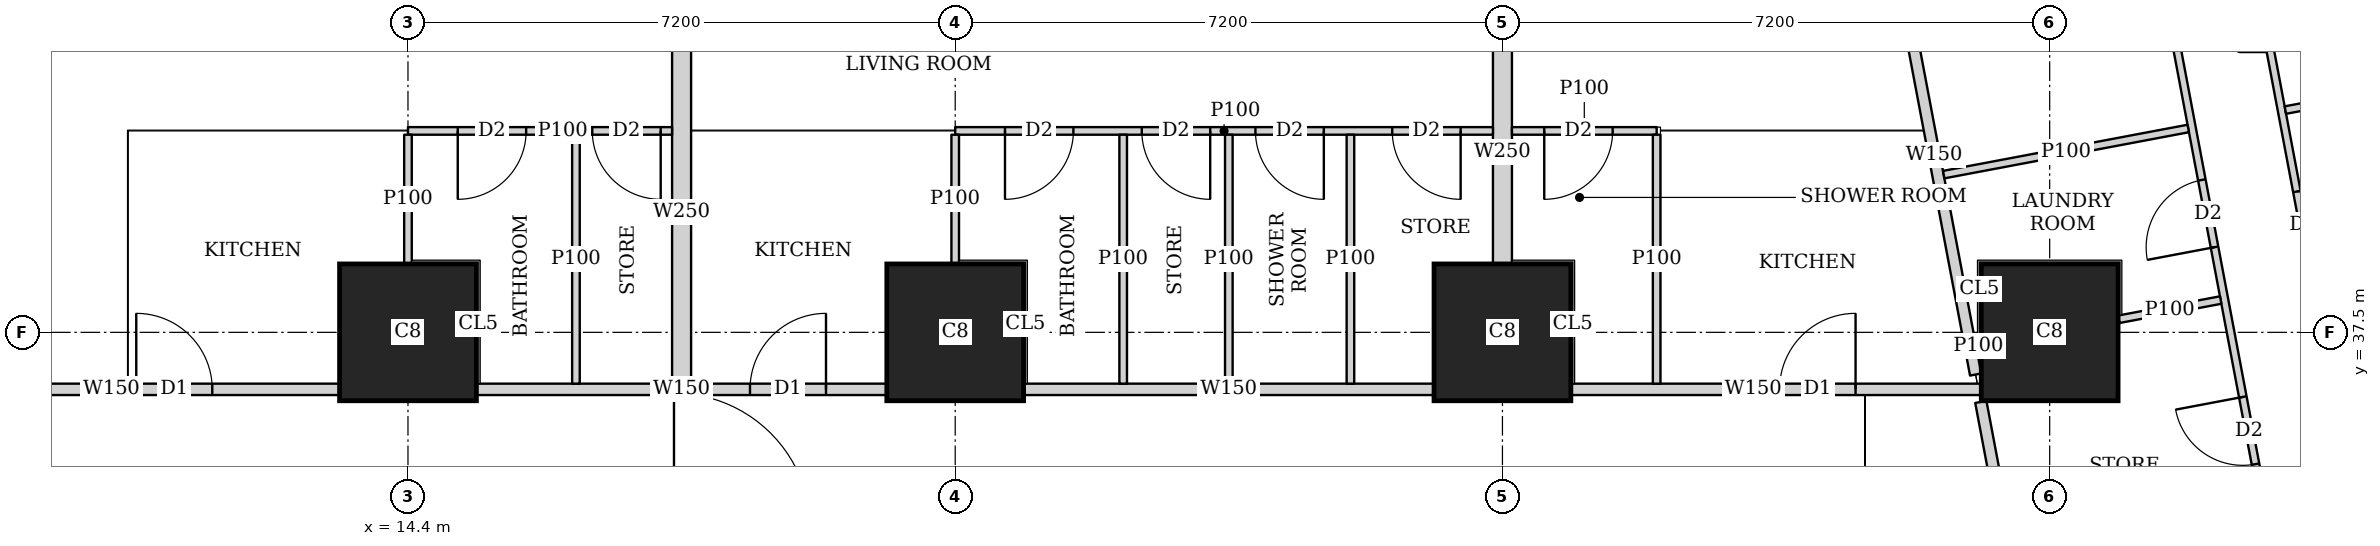
"""IFC4 building model, lengths in metres.
Left out: names, types, materials, properties, quantities, classifications, styles, units other than length and angle.
Written with IfcOpenShell. Run it as: python <this file> out.ifc"""

import sys

from ifc_helpers import new_model, si_unit, direction, frame, frame_2d, origin, origin_2d, place, context, subcontext, project, spatial, rectangle, extrude, element, fill, save


model = new_model("IFC4")
c1 = context("Model", 3, precision=1e-05, world=origin(), true_north=direction((0.0, 1.0)))
c2 = subcontext(c1, "Body", "Model", "MODEL_VIEW")
j1 = project(units=[si_unit("LENGTHUNIT", "METRE"), si_unit("PLANEANGLEUNIT", "RADIAN")], contexts=[c1])
p1 = place(None, origin())
s1 = spatial("IfcSite", under=j1, at=p1, CompositionType="ELEMENT")
p2 = place(p1, origin())
s2 = spatial("IfcBuilding", under=s1, at=p2, CompositionType="ELEMENT")
p3 = place(p2, frame((0.0, 0.0, 53.75)))
s3 = spatial("IfcBuildingStorey", under=s2, at=p3, CompositionType="ELEMENT", Elevation=53.75)
for number, where, z_axis, x_axis in (
    (1, (14.4, 37.5, 0.0), (0.0, 0.0, 1.0), (1.0, 0.0, 0.0)),
    (2, (21.6, 37.5, 0.0), (0.0, 0.0, 1.0), (1.0, 0.0, 0.0)),
    (3, (28.8, 37.5, 0.0), (0.0, 0.0, 1.0), (1.0, 0.0, 0.0)),
    (4, (36.0, 37.5, 0.0), (0.0, 0.0, 1.0), (1.0, 0.0, 0.0)),
):
    element("IfcColumn", number, at=place(p3, frame(where, z_axis=z_axis, x_axis=x_axis)), inside=s3, PredefinedType="COLUMN", context=c2, shape_type="SweptSolid", body=[
        extrude(rectangle(XDim=1.8, YDim=1.8, at=origin_2d()), origin(), (0.0, 0.0, 1.0), 3.75),
    ])
p4 = place(p3, frame((8.1, 36.75, 0.0), z_axis=(0.0, 0.0, 1.0), x_axis=(1.0, 0.0, 0.0)))
e5 = element("IfcWall", 5, at=p4, inside=s3, PredefinedType="SOLIDWALL", context=c2, shape_type="SweptSolid", body=[
    extrude(rectangle(XDim=5.399, YDim=0.15, at=frame_2d((2.699, 0.0))), origin(), (0.0, 0.0, 1.0), 3.5),
])
p5 = place(p4, frame((2.725, 0.0, 0.0)))
e6 = element("IfcOpeningElement", 6, at=p5, cuts=e5, PredefinedType="OPENING", context=c2, shape_type="SweptSolid", body=[
    extrude(rectangle(XDim=1.0, YDim=2.1, at=frame_2d((0.5, 1.05))), frame((0.0, 0.085, 0.0), z_axis=(0.0, -1.0, 0.0), x_axis=(1.0, 0.0, 0.0)), (0.0, 0.0, 1.0), 0.17),
])
p6 = place(p3, frame((15.301, 36.75, 0.0), z_axis=(0.0, 0.0, 1.0), x_axis=(1.0, 0.0, 0.0)))
e7 = element("IfcWall", 7, at=p6, inside=s3, PredefinedType="SOLIDWALL", context=c2, shape_type="SweptSolid", body=[
    extrude(rectangle(XDim=5.398, YDim=0.15, at=frame_2d((2.699, 0.0))), origin(), (0.0, 0.0, 1.0), 3.5),
])
p7 = place(p6, frame((3.599, 0.0, 0.0)))
e8 = element("IfcOpeningElement", 8, at=p7, cuts=e7, PredefinedType="OPENING", context=c2, shape_type="SweptSolid", body=[
    extrude(rectangle(XDim=1.0, YDim=2.1, at=frame_2d((0.5, 1.05))), frame((0.0, 0.085, 0.0), z_axis=(0.0, -1.0, 0.0), x_axis=(1.0, 0.0, 0.0)), (0.0, 0.0, 1.0), 0.17),
])
p8 = place(p3, frame((22.501, 36.75, 0.0), z_axis=(0.0, 0.0, 1.0), x_axis=(1.0, 0.0, 0.0)))
e9 = element("IfcWall", 9, at=p8, inside=s3, PredefinedType="SOLIDWALL", context=c2, shape_type="SweptSolid", body=[
    extrude(rectangle(XDim=5.398, YDim=0.15, at=frame_2d((2.699, 0.0))), origin(), (0.0, 0.0, 1.0), 3.5),
])
p9 = place(p3, frame((29.701, 36.75, 0.0), z_axis=(0.0, 0.0, 1.0), x_axis=(1.0, 0.0, 0.0)))
e10 = element("IfcWall", 10, at=p9, inside=s3, PredefinedType="SOLIDWALL", context=c2, shape_type="SweptSolid", body=[
    extrude(rectangle(XDim=5.399, YDim=0.15, at=frame_2d((2.7, 0.0))), origin(), (0.0, 0.0, 1.0), 3.5),
])
p10 = place(p9, frame((2.745, 0.0, 0.0)))
e11 = element("IfcOpeningElement", 11, at=p10, cuts=e10, PredefinedType="OPENING", context=c2, shape_type="SweptSolid", body=[
    extrude(rectangle(XDim=1.0, YDim=2.1, at=frame_2d((0.5, 1.05))), frame((0.0, 0.085, 0.0), z_axis=(0.0, -1.0, 0.0), x_axis=(1.0, 0.0, 0.0)), (0.0, 0.0, 1.0), 0.17),
])
p11 = place(p3, frame((33.933, 42.73, 0.0), z_axis=(0.0, 0.0, 1.0), x_axis=(0.185617897238, -0.982622000682, 0.0)))
e12 = element("IfcWall", 12, at=p11, inside=s3, PredefinedType="SOLIDWALL", context=c2, shape_type="SweptSolid", body=[
    extrude(rectangle(XDim=5.887, YDim=0.15, at=frame_2d((2.944, 0.0))), origin(), (0.0, 0.0, 1.0), 3.5),
])
p12 = place(p3, frame((35.094, 36.585, 0.0), z_axis=(0.0, 0.0, 1.0), x_axis=(0.185588860311, -0.982627485331, 0.0)))
e13 = element("IfcWall", 13, at=p12, inside=s3, PredefinedType="SOLIDWALL", context=c2, shape_type="SweptSolid", body=[
    extrude(rectangle(XDim=34.797, YDim=0.15, at=frame_2d((17.399, 0.0))), origin(), (0.0, 0.0, 1.0), 2.5),
])
p13 = place(p12, frame((9.828, 0.0, 0.0)))
e14 = element("IfcOpeningElement", 14, at=p13, cuts=e13, PredefinedType="OPENING", context=c2, shape_type="SweptSolid", body=[
    extrude(rectangle(XDim=1.0, YDim=2.1, at=frame_2d((0.5, 1.05))), frame((0.0, 0.085, 0.0), z_axis=(0.0, -1.0, 0.0), x_axis=(1.0, 0.0, 0.0)), (0.0, 0.0, 1.0), 0.17),
])
p14 = place(p12, frame((13.645, 0.0, 0.0)))
e15 = element("IfcOpeningElement", 15, at=p14, cuts=e13, PredefinedType="OPENING", context=c2, shape_type="SweptSolid", body=[
    extrude(rectangle(XDim=1.0, YDim=2.1, at=frame_2d((0.5, 1.05))), frame((0.0, 0.085, 0.0), z_axis=(0.0, -1.0, 0.0), x_axis=(1.0, 0.0, 0.0)), (0.0, 0.0, 1.0), 0.17),
])
p15 = place(p12, frame((25.9, 0.0, 0.0)))
e16 = element("IfcOpeningElement", 16, at=p15, cuts=e13, PredefinedType="OPENING", context=c2, shape_type="SweptSolid", body=[
    extrude(rectangle(XDim=1.0, YDim=2.1, at=frame_2d((0.5, 1.05))), frame((0.0, 0.085, 0.0), z_axis=(0.0, -1.0, 0.0), x_axis=(1.0, 0.0, 0.0)), (0.0, 0.0, 1.0), 0.17),
])
p16 = place(p3, frame((38.9, 41.22, 0.0), z_axis=(0.0, 0.0, 1.0), x_axis=(0.185521843026, -0.98264014052, 0.0)))
e17 = element("IfcWall", 17, at=p16, inside=s3, PredefinedType="PARTITIONING", context=c2, shape_type="SweptSolid", body=[
    extrude(rectangle(XDim=12.058, YDim=0.1, at=frame_2d((6.029, 0.0))), origin(), (0.0, 0.0, 1.0), 2.5),
])
p17 = place(p16, frame((9.55, 0.0, 0.0)))
e18 = element("IfcOpeningElement", 18, at=p17, cuts=e17, PredefinedType="OPENING", context=c2, shape_type="SweptSolid", body=[
    extrude(rectangle(XDim=0.9, YDim=2.1, at=frame_2d((0.45, 1.05))), frame((0.0, 0.06, 0.0), z_axis=(0.0, -1.0, 0.0), x_axis=(1.0, 0.0, 0.0)), (0.0, 0.0, 1.0), 0.12),
])
p18 = place(p16, frame((7.352, 0.0, 0.0)))
e19 = element("IfcOpeningElement", 19, at=p18, cuts=e17, PredefinedType="OPENING", context=c2, shape_type="SweptSolid", body=[
    extrude(rectangle(XDim=0.9, YDim=2.1, at=frame_2d((0.45, 1.05))), frame((0.0, 0.06, 0.0), z_axis=(0.0, -1.0, 0.0), x_axis=(1.0, 0.0, 0.0)), (0.0, 0.0, 1.0), 0.12),
])
p19 = place(p16, frame((1.9, 0.0, 0.0)))
e20 = element("IfcOpeningElement", 20, at=p19, cuts=e17, PredefinedType="OPENING", context=c2, shape_type="SweptSolid", body=[
    extrude(rectangle(XDim=0.9, YDim=2.1, at=frame_2d((0.45, 1.05))), frame((0.0, 0.06, 0.0), z_axis=(0.0, -1.0, 0.0), x_axis=(1.0, 0.0, 0.0)), (0.0, 0.0, 1.0), 0.12),
])
p20 = place(p3, frame((37.514, 42.089, 0.0), z_axis=(0.0, 0.0, 1.0), x_axis=(0.1856087397, -0.982623730503, 0.0)))
e21 = element("IfcWall", 21, at=p20, inside=s3, PredefinedType="PARTITIONING", context=c2, shape_type="SweptSolid", body=[
    extrude(rectangle(XDim=13.33, YDim=0.1, at=frame_2d((6.665, 0.0))), origin(), (0.0, 0.0, 1.0), 2.5),
])
p21 = place(p20, frame((11.825, 0.0, 0.0)))
e22 = element("IfcOpeningElement", 22, at=p21, cuts=e21, PredefinedType="OPENING", context=c2, shape_type="SweptSolid", body=[
    extrude(rectangle(XDim=0.9, YDim=2.1, at=frame_2d((0.45, 1.05))), frame((0.0, 0.06, 0.0), z_axis=(0.0, -1.0, 0.0), x_axis=(1.0, 0.0, 0.0)), (0.0, 0.0, 1.0), 0.12),
])
p22 = place(p20, frame((8.203, 0.0, 0.0)))
e23 = element("IfcOpeningElement", 23, at=p22, cuts=e21, PredefinedType="OPENING", context=c2, shape_type="SweptSolid", body=[
    extrude(rectangle(XDim=0.9, YDim=2.1, at=frame_2d((0.45, 1.05))), frame((0.0, 0.06, 0.0), z_axis=(0.0, -1.0, 0.0), x_axis=(1.0, 0.0, 0.0)), (0.0, 0.0, 1.0), 0.12),
])
p23 = place(p20, frame((2.63, 0.0, 0.0)))
e24 = element("IfcOpeningElement", 24, at=p23, cuts=e21, PredefinedType="OPENING", context=c2, shape_type="SweptSolid", body=[
    extrude(rectangle(XDim=0.9, YDim=2.1, at=frame_2d((0.45, 1.05))), frame((0.0, 0.06, 0.0), z_axis=(0.0, -1.0, 0.0), x_axis=(1.0, 0.0, 0.0)), (0.0, 0.0, 1.0), 0.12),
])
p24 = place(p20, frame((9.916, 0.0, 0.0)))
e25 = element("IfcOpeningElement", 25, at=p24, cuts=e21, PredefinedType="OPENING", context=c2, shape_type="SweptSolid", body=[
    extrude(rectangle(XDim=0.9, YDim=2.1, at=frame_2d((0.45, 1.05))), frame((0.0, 0.06, 0.0), z_axis=(0.0, -1.0, 0.0), x_axis=(1.0, 0.0, 0.0)), (0.0, 0.0, 1.0), 0.12),
])
p25 = place(p20, frame((5.535, 0.0, 0.0)))
e26 = element("IfcOpeningElement", 26, at=p25, cuts=e21, PredefinedType="OPENING", context=c2, shape_type="SweptSolid", body=[
    extrude(rectangle(XDim=0.9, YDim=2.1, at=frame_2d((0.45, 1.05))), frame((0.0, 0.06, 0.0), z_axis=(0.0, -1.0, 0.0), x_axis=(1.0, 0.0, 0.0)), (0.0, 0.0, 1.0), 0.12),
])
p26 = place(p3, frame((43.277, 41.212, 0.0), z_axis=(0.0, 0.0, 1.0), x_axis=(-0.982665405803, -0.185387972203, 0.0)))
e27 = element("IfcWall", 27, at=p26, inside=s3, PredefinedType="PARTITIONING", context=c2, shape_type="SweptSolid", body=[
    extrude(rectangle(XDim=4.25, YDim=0.1, at=frame_2d((2.125, 0.0))), origin(), (0.0, 0.0, 1.0), 2.05),
])
p27 = place(p3, frame((37.823, 40.182, 0.0), z_axis=(0.0, 0.0, 1.0), x_axis=(-0.982664729897, -0.18539155487, 0.0)))
e28 = element("IfcWall", 28, at=p27, inside=s3, PredefinedType="PARTITIONING", context=c2, shape_type="SweptSolid", body=[
    extrude(rectangle(XDim=3.274, YDim=0.1, at=frame_2d((1.637, 0.0))), origin(), (0.0, 0.0, 1.0), 3.5),
])
p28 = place(p3, frame((38.25, 37.925, 0.0), z_axis=(0.0, 0.0, 1.0), x_axis=(-0.982650574676, -0.185466568658, 0.0)))
e29 = element("IfcWall", 29, at=p28, inside=s3, PredefinedType="PARTITIONING", context=c2, shape_type="SweptSolid", body=[
    extrude(rectangle(XDim=1.364, YDim=0.1, at=frame_2d((0.682, 0.0))), origin(), (0.0, 0.0, 1.0), 3.5),
])
p29 = place(p3, frame((35.09, 37.328, 0.0), z_axis=(0.0, 0.0, 1.0), x_axis=(-0.982590620415, -0.185783940835, 0.0)))
e30 = element("IfcWall", 30, at=p29, inside=s3, PredefinedType="PARTITIONING", context=c2, shape_type="SweptSolid", body=[
    extrude(rectangle(XDim=0.059, YDim=0.1, at=frame_2d((0.03, 0.0))), origin(), (0.0, 0.0, 1.0), 3.5),
])
p30 = place(p3, frame((14.4, 40.15, 0.0), z_axis=(0.0, 0.0, 1.0), x_axis=(1.0, 0.0, 0.0)))
e31 = element("IfcWall", 31, at=p30, inside=s3, PredefinedType="PARTITIONING", context=c2, shape_type="SweptSolid", body=[
    extrude(rectangle(XDim=3.475, YDim=0.1, at=frame_2d((1.738, 0.0))), origin(), (0.0, 0.0, 1.0), 3.5),
])
p31 = place(p30, frame((0.655, 0.0, 0.0)))
e32 = element("IfcOpeningElement", 32, at=p31, cuts=e31, PredefinedType="OPENING", context=c2, shape_type="SweptSolid", body=[
    extrude(rectangle(XDim=0.9, YDim=2.1, at=frame_2d((0.45, 1.05))), frame((0.0, 0.06, 0.0), z_axis=(0.0, -1.0, 0.0), x_axis=(1.0, 0.0, 0.0)), (0.0, 0.0, 1.0), 0.12),
])
p32 = place(p30, frame((2.425, 0.0, 0.0)))
e33 = element("IfcOpeningElement", 33, at=p32, cuts=e31, PredefinedType="OPENING", context=c2, shape_type="SweptSolid", body=[
    extrude(rectangle(XDim=0.9, YDim=2.1, at=frame_2d((0.45, 1.05))), frame((0.0, 0.06, 0.0), z_axis=(0.0, -1.0, 0.0), x_axis=(1.0, 0.0, 0.0)), (0.0, 0.0, 1.0), 0.12),
])
p33 = place(p3, frame((14.4, 38.401, 0.0), z_axis=(0.0, 0.0, 1.0), x_axis=(0.0, 1.0, 0.0)))
e34 = element("IfcWall", 34, at=p33, inside=s3, PredefinedType="PARTITIONING", context=c2, shape_type="SweptSolid", body=[
    extrude(rectangle(XDim=1.699, YDim=0.1, at=frame_2d((0.85, 0.0))), origin(), (0.0, 0.0, 1.0), 3.5),
])
p34 = place(p3, frame((16.61, 36.825, 0.0), z_axis=(0.0, 0.0, 1.0), x_axis=(0.0, 1.0, 0.0)))
e35 = element("IfcWall", 35, at=p34, inside=s3, PredefinedType="PARTITIONING", context=c2, shape_type="SweptSolid", body=[
    extrude(rectangle(XDim=3.275, YDim=0.1, at=frame_2d((1.638, 0.0))), origin(), (0.0, 0.0, 1.0), 3.5),
])
p35 = place(p3, frame((21.6, 40.15, 0.0), z_axis=(0.0, 0.0, 1.0), x_axis=(1.0, 0.0, 0.0)))
e36 = element("IfcWall", 36, at=p35, inside=s3, PredefinedType="PARTITIONING", context=c2, shape_type="SweptSolid", body=[
    extrude(rectangle(XDim=7.075, YDim=0.1, at=frame_2d((3.538, 0.0))), origin(), (0.0, 0.0, 1.0), 3.5),
])
p36 = place(p35, frame((0.655, 0.0, 0.0)))
e37 = element("IfcOpeningElement", 37, at=p36, cuts=e36, PredefinedType="OPENING", context=c2, shape_type="SweptSolid", body=[
    extrude(rectangle(XDim=0.9, YDim=2.1, at=frame_2d((0.45, 1.05))), frame((0.0, 0.06, 0.0), z_axis=(0.0, -1.0, 0.0), x_axis=(1.0, 0.0, 0.0)), (0.0, 0.0, 1.0), 0.12),
])
p37 = place(p35, frame((3.95, 0.0, 0.0)))
e38 = element("IfcOpeningElement", 38, at=p37, cuts=e36, PredefinedType="OPENING", context=c2, shape_type="SweptSolid", body=[
    extrude(rectangle(XDim=0.9, YDim=2.1, at=frame_2d((0.45, 1.05))), frame((0.0, 0.06, 0.0), z_axis=(0.0, -1.0, 0.0), x_axis=(1.0, 0.0, 0.0)), (0.0, 0.0, 1.0), 0.12),
])
p38 = place(p35, frame((2.455, 0.0, 0.0)))
e39 = element("IfcOpeningElement", 39, at=p38, cuts=e36, PredefinedType="OPENING", context=c2, shape_type="SweptSolid", body=[
    extrude(rectangle(XDim=0.9, YDim=2.1, at=frame_2d((0.45, 1.05))), frame((0.0, 0.06, 0.0), z_axis=(0.0, -1.0, 0.0), x_axis=(1.0, 0.0, 0.0)), (0.0, 0.0, 1.0), 0.12),
])
p39 = place(p35, frame((5.75, 0.0, 0.0)))
e40 = element("IfcOpeningElement", 40, at=p39, cuts=e36, PredefinedType="OPENING", context=c2, shape_type="SweptSolid", body=[
    extrude(rectangle(XDim=0.9, YDim=2.1, at=frame_2d((0.45, 1.05))), frame((0.0, 0.06, 0.0), z_axis=(0.0, -1.0, 0.0), x_axis=(1.0, 0.0, 0.0)), (0.0, 0.0, 1.0), 0.12),
])
p40 = place(p3, frame((21.6, 38.401, 0.0), z_axis=(0.0, 0.0, 1.0), x_axis=(0.0, 1.0, 0.0)))
e41 = element("IfcWall", 41, at=p40, inside=s3, PredefinedType="PARTITIONING", context=c2, shape_type="SweptSolid", body=[
    extrude(rectangle(XDim=1.699, YDim=0.1, at=frame_2d((0.85, 0.0))), origin(), (0.0, 0.0, 1.0), 3.5),
])
for number, where, z_axis, x_axis in (
    (42, (25.2, 36.825, 0.0), (0.0, 0.0, 1.0), (0.0, 1.0, 0.0)),
    (43, (23.81, 36.825, 0.0), (0.0, 0.0, 1.0), (0.0, 1.0, 0.0)),
    (44, (26.8, 36.825, 0.0), (0.0, 0.0, 1.0), (0.0, 1.0, 0.0)),
):
    element("IfcWall", number, at=place(p3, frame(where, z_axis=z_axis, x_axis=x_axis)), inside=s3, PredefinedType="PARTITIONING", context=c2, shape_type="SweptSolid", body=[
        extrude(rectangle(XDim=3.275, YDim=0.1, at=frame_2d((1.638, 0.0))), origin(), (0.0, 0.0, 1.0), 3.5),
    ])
p41 = place(p3, frame((18.0, 36.825, 0.0), z_axis=(0.0, 0.0, 1.0), x_axis=(0.0, 1.0, 0.0)))
e45 = element("IfcWall", 45, at=p41, inside=s3, PredefinedType="SOLIDWALL", context=c2, shape_type="SweptSolid", body=[
    extrude(rectangle(XDim=4.525, YDim=0.25, at=frame_2d((2.263, 0.0))), origin(), (0.0, 0.0, 1.0), 3.5),
])
p42 = place(p3, frame((28.925, 40.15, 0.0), z_axis=(0.0, 0.0, 1.0), x_axis=(1.0, 0.0, 0.0)))
e46 = element("IfcWall", 46, at=p42, inside=s3, PredefinedType="PARTITIONING", context=c2, shape_type="SweptSolid", body=[
    extrude(rectangle(XDim=1.904, YDim=0.1, at=frame_2d((0.952, 0.0))), origin(), (0.0, 0.0, 1.0), 3.5),
])
p43 = place(p42, frame((0.425, 0.0, 0.0)))
e47 = element("IfcOpeningElement", 47, at=p43, cuts=e46, PredefinedType="OPENING", context=c2, shape_type="SweptSolid", body=[
    extrude(rectangle(XDim=0.9, YDim=2.1, at=frame_2d((0.45, 1.05))), frame((0.0, 0.06, 0.0), z_axis=(0.0, -1.0, 0.0), x_axis=(1.0, 0.0, 0.0)), (0.0, 0.0, 1.0), 0.12),
])
p44 = place(p3, frame((30.829, 36.825, 0.0), z_axis=(0.0, 0.0, 1.0), x_axis=(0.0, 1.0, 0.0)))
e48 = element("IfcWall", 48, at=p44, inside=s3, PredefinedType="PARTITIONING", context=c2, shape_type="SweptSolid", body=[
    extrude(rectangle(XDim=3.275, YDim=0.1, at=frame_2d((1.638, 0.0))), origin(), (0.0, 0.0, 1.0), 3.5),
])
p45 = place(p3, frame((28.8, 38.401, 0.0), z_axis=(0.0, 0.0, 1.0), x_axis=(0.0, 1.0, 0.0)))
e49 = element("IfcWall", 49, at=p45, inside=s3, PredefinedType="SOLIDWALL", context=c2, shape_type="SweptSolid", body=[
    extrude(rectangle(XDim=2.949, YDim=0.25, at=frame_2d((1.475, 0.0))), origin(), (0.0, 0.0, 1.0), 3.5),
])
p46 = place(p19, origin())
e50 = element("IfcDoor", 50, at=p46, inside=s3, OperationType="SINGLE_SWING_LEFT", PredefinedType="DOOR", context=c2, shape_type="SweptSolid", body=[
    extrude(rectangle(XDim=0.9, YDim=2.1, at=frame_2d((0.45, 1.05))), frame((0.0, 0.025, 0.0), z_axis=(0.0, -1.0, 0.0), x_axis=(1.0, 0.0, 0.0)), (0.0, 0.0, 1.0), 0.05),
])
fill(e20, e50)
p47 = place(p23, origin())
e51 = element("IfcDoor", 51, at=p47, inside=s3, OperationType="SINGLE_SWING_LEFT", PredefinedType="DOOR", context=c2, shape_type="SweptSolid", body=[
    extrude(rectangle(XDim=0.9, YDim=2.1, at=frame_2d((0.45, 1.05))), frame((0.0, 0.025, 0.0), z_axis=(0.0, -1.0, 0.0), x_axis=(1.0, 0.0, 0.0)), (0.0, 0.0, 1.0), 0.05),
])
fill(e24, e51)
p48 = place(p25, origin())
e52 = element("IfcDoor", 52, at=p48, inside=s3, OperationType="SINGLE_SWING_RIGHT", PredefinedType="DOOR", context=c2, shape_type="SweptSolid", body=[
    extrude(rectangle(XDim=0.9, YDim=2.1, at=frame_2d((0.45, 1.05))), frame((0.0, 0.025, 0.0), z_axis=(0.0, -1.0, 0.0), x_axis=(1.0, 0.0, 0.0)), (0.0, 0.0, 1.0), 0.05),
])
fill(e26, e52)
p49 = place(p31, origin())
e53 = element("IfcDoor", 53, at=p49, inside=s3, OperationType="SINGLE_SWING_RIGHT", PredefinedType="DOOR", context=c2, shape_type="SweptSolid", body=[
    extrude(rectangle(XDim=0.9, YDim=2.1, at=frame_2d((0.45, 1.05))), frame((0.0, 0.025, 0.0), z_axis=(0.0, -1.0, 0.0), x_axis=(1.0, 0.0, 0.0)), (0.0, 0.0, 1.0), 0.05),
])
fill(e32, e53)
p50 = place(p32, origin())
e54 = element("IfcDoor", 54, at=p50, inside=s3, OperationType="SINGLE_SWING_LEFT", PredefinedType="DOOR", context=c2, shape_type="SweptSolid", body=[
    extrude(rectangle(XDim=0.9, YDim=2.1, at=frame_2d((0.45, 1.05))), frame((0.0, 0.025, 0.0), z_axis=(0.0, -1.0, 0.0), x_axis=(1.0, 0.0, 0.0)), (0.0, 0.0, 1.0), 0.05),
])
fill(e33, e54)
p51 = place(p5, origin())
e55 = element("IfcDoor", 55, at=p51, inside=s3, OperationType="SINGLE_SWING_LEFT", PredefinedType="DOOR", context=c2, shape_type="SweptSolid", body=[
    extrude(rectangle(XDim=1.0, YDim=2.1, at=frame_2d((0.5, 1.05))), frame((0.0, 0.025, 0.0), z_axis=(0.0, -1.0, 0.0), x_axis=(1.0, 0.0, 0.0)), (0.0, 0.0, 1.0), 0.05),
])
fill(e6, e55)
p52 = place(p36, origin())
e56 = element("IfcDoor", 56, at=p52, inside=s3, OperationType="SINGLE_SWING_RIGHT", PredefinedType="DOOR", context=c2, shape_type="SweptSolid", body=[
    extrude(rectangle(XDim=0.9, YDim=2.1, at=frame_2d((0.45, 1.05))), frame((0.0, 0.025, 0.0), z_axis=(0.0, -1.0, 0.0), x_axis=(1.0, 0.0, 0.0)), (0.0, 0.0, 1.0), 0.05),
])
fill(e37, e56)
p53 = place(p37, origin())
e57 = element("IfcDoor", 57, at=p53, inside=s3, OperationType="SINGLE_SWING_LEFT", PredefinedType="DOOR", context=c2, shape_type="SweptSolid", body=[
    extrude(rectangle(XDim=0.9, YDim=2.1, at=frame_2d((0.45, 1.05))), frame((0.0, 0.025, 0.0), z_axis=(0.0, -1.0, 0.0), x_axis=(1.0, 0.0, 0.0)), (0.0, 0.0, 1.0), 0.05),
])
fill(e38, e57)
p54 = place(p38, origin())
e58 = element("IfcDoor", 58, at=p54, inside=s3, OperationType="SINGLE_SWING_LEFT", PredefinedType="DOOR", context=c2, shape_type="SweptSolid", body=[
    extrude(rectangle(XDim=0.9, YDim=2.1, at=frame_2d((0.45, 1.05))), frame((0.0, 0.025, 0.0), z_axis=(0.0, -1.0, 0.0), x_axis=(1.0, 0.0, 0.0)), (0.0, 0.0, 1.0), 0.05),
])
fill(e39, e58)
p55 = place(p39, origin())
e59 = element("IfcDoor", 59, at=p55, inside=s3, OperationType="SINGLE_SWING_LEFT", PredefinedType="DOOR", context=c2, shape_type="SweptSolid", body=[
    extrude(rectangle(XDim=0.9, YDim=2.1, at=frame_2d((0.45, 1.05))), frame((0.0, 0.025, 0.0), z_axis=(0.0, -1.0, 0.0), x_axis=(1.0, 0.0, 0.0)), (0.0, 0.0, 1.0), 0.05),
])
fill(e40, e59)
p56 = place(p7, origin())
e60 = element("IfcDoor", 60, at=p56, inside=s3, OperationType="SINGLE_SWING_RIGHT", PredefinedType="DOOR", context=c2, shape_type="SweptSolid", body=[
    extrude(rectangle(XDim=1.0, YDim=2.1, at=frame_2d((0.5, 1.05))), frame((0.0, 0.025, 0.0), z_axis=(0.0, -1.0, 0.0), x_axis=(1.0, 0.0, 0.0)), (0.0, 0.0, 1.0), 0.05),
])
fill(e8, e60)
p57 = place(p43, origin())
e61 = element("IfcDoor", 61, at=p57, inside=s3, OperationType="SINGLE_SWING_RIGHT", PredefinedType="DOOR", context=c2, shape_type="SweptSolid", body=[
    extrude(rectangle(XDim=0.9, YDim=2.1, at=frame_2d((0.45, 1.05))), frame((0.0, 0.025, 0.0), z_axis=(0.0, -1.0, 0.0), x_axis=(1.0, 0.0, 0.0)), (0.0, 0.0, 1.0), 0.05),
])
fill(e47, e61)
p58 = place(p10, origin())
e62 = element("IfcDoor", 62, at=p58, inside=s3, OperationType="SINGLE_SWING_RIGHT", PredefinedType="DOOR", context=c2, shape_type="SweptSolid", body=[
    extrude(rectangle(XDim=1.0, YDim=2.1, at=frame_2d((0.5, 1.05))), frame((0.0, 0.025, 0.0), z_axis=(0.0, -1.0, 0.0), x_axis=(1.0, 0.0, 0.0)), (0.0, 0.0, 1.0), 0.05),
])
fill(e11, e62)
save(model, sys.argv[1])
